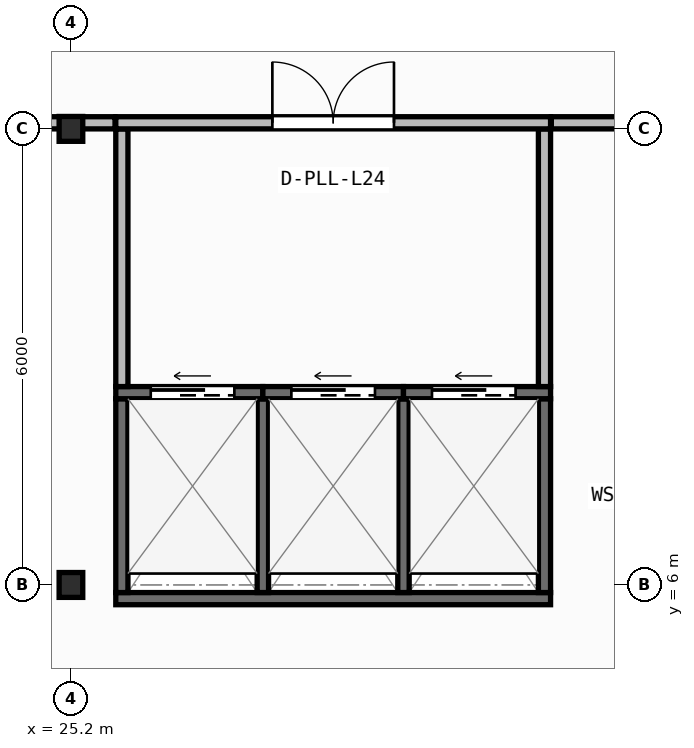
"""IFC4 building model, lengths in metres.
Left out: names, types, materials, properties, quantities, classifications, styles, units other than length and angle.
Written with IfcOpenShell. Run it as: python <this file> out.ifc"""

import sys

from ifc_helpers import new_model, si_unit, direction, frame, frame_2d, origin, origin_2d, place, context, subcontext, project, spatial, rectangle, i_section, extrude, element, fill, save


model = new_model("IFC4")
c1 = context("Model", 3, precision=1e-05, world=origin(), true_north=direction((0.0, 1.0)))
c2 = subcontext(c1, "Body", "Model", "MODEL_VIEW")
j1 = project(units=[si_unit("LENGTHUNIT", "METRE"), si_unit("PLANEANGLEUNIT", "RADIAN")], contexts=[c1])
p1 = place(None, origin())
s1 = spatial("IfcSite", under=j1, at=p1, CompositionType="ELEMENT")
p2 = place(p1, origin())
s2 = spatial("IfcBuilding", under=s1, at=p2, CompositionType="ELEMENT")
p3 = place(p2, frame((0.0, 0.0, 97.55)))
s3 = spatial("IfcBuildingStorey", under=s2, at=p3, CompositionType="ELEMENT", Elevation=97.55)
for number, where, z_axis, x_axis in (
    (1, (25.2, 6.0, 0.0), (0.0, 0.0, 1.0), (1.0, 0.0, 0.0)),
    (2, (25.2, 12.0, 0.0), (0.0, 0.0, 1.0), (1.0, 0.0, 0.0)),
):
    element("IfcColumn", number, at=place(p3, frame(where, z_axis=z_axis, x_axis=x_axis)), inside=s3, PredefinedType="COLUMN", context=c2, shape_type="SweptSolid", body=[
        extrude(i_section(OverallWidth=0.311, OverallDepth=0.327, WebThickness=0.016, FlangeThickness=0.025, FilletRadius=0.017, at=origin_2d()), origin(), (0.0, 0.0, 1.0), 5.8),
    ])
p4 = place(p3, frame((25.79, 5.82, 0.0), z_axis=(0.0, 0.0, 1.0), x_axis=(1.0, 0.0, 0.0)))
e3 = element("IfcWall", 3, at=p4, inside=s3, PredefinedType="SHEAR", context=c2, shape_type="SweptSolid", body=[
    extrude(rectangle(XDim=5.72, YDim=0.16, at=frame_2d((2.86, 0.0))), origin(), (0.0, 0.0, 1.0), 5.56),
])
for number, where, z_axis, x_axis in (
    (4, (25.87, 5.9, 0.0), (0.0, 0.0, 1.0), (0.0, 1.0, 0.0)),
    (5, (31.43, 5.9, 0.0), (0.0, 0.0, 1.0), (0.0, 1.0, 0.0)),
):
    element("IfcWall", number, at=place(p3, frame(where, z_axis=z_axis, x_axis=x_axis)), inside=s3, PredefinedType="SHEAR", context=c2, shape_type="SweptSolid", body=[
        extrude(rectangle(XDim=2.55, YDim=0.16, at=frame_2d((1.275, 0.0))), origin(), (0.0, 0.0, 1.0), 5.56),
    ])
for number, where, z_axis, x_axis in (
    (6, (27.725, 5.9, 0.0), (0.0, 0.0, 1.0), (0.0, 1.0, 0.0)),
    (7, (29.575, 5.9, 0.0), (0.0, 0.0, 1.0), (0.0, 1.0, 0.0)),
):
    element("IfcWall", number, at=place(p3, frame(where, z_axis=z_axis, x_axis=x_axis)), inside=s3, PredefinedType="SHEAR", context=c2, shape_type="SweptSolid", body=[
        extrude(rectangle(XDim=2.55, YDim=0.15, at=frame_2d((1.275, 0.0))), origin(), (0.0, 0.0, 1.0), 5.56),
    ])
p5 = place(p3, frame((25.79, 8.53, 0.0), z_axis=(0.0, 0.0, 1.0), x_axis=(1.0, 0.0, 0.0)))
e8 = element("IfcWall", 8, at=p5, inside=s3, PredefinedType="SHEAR", context=c2, shape_type="SweptSolid", body=[
    extrude(rectangle(XDim=1.935, YDim=0.16, at=frame_2d((0.968, 0.0))), origin(), (0.0, 0.0, 1.0), 5.56),
])
p6 = place(p5, frame((0.46, 0.0, 0.0)))
e9 = element("IfcOpeningElement", 9, at=p6, cuts=e8, PredefinedType="OPENING", context=c2, shape_type="SweptSolid", body=[
    extrude(rectangle(XDim=1.1, YDim=2.15, at=frame_2d((0.55, 1.075))), frame((0.0, 0.09, 0.0), z_axis=(0.0, -1.0, 0.0), x_axis=(1.0, 0.0, 0.0)), (0.0, 0.0, 1.0), 0.18),
])
p7 = place(p3, frame((27.725, 8.53, 0.0), z_axis=(0.0, 0.0, 1.0), x_axis=(1.0, 0.0, 0.0)))
e10 = element("IfcWall", 10, at=p7, inside=s3, PredefinedType="SHEAR", context=c2, shape_type="SweptSolid", body=[
    extrude(rectangle(XDim=1.85, YDim=0.16, at=frame_2d((0.925, 0.0))), origin(), (0.0, 0.0, 1.0), 5.56),
])
p8 = place(p7, frame((0.375, 0.0, 0.0)))
e11 = element("IfcOpeningElement", 11, at=p8, cuts=e10, PredefinedType="OPENING", context=c2, shape_type="SweptSolid", body=[
    extrude(rectangle(XDim=1.1, YDim=2.15, at=frame_2d((0.55, 1.075))), frame((0.0, 0.09, 0.0), z_axis=(0.0, -1.0, 0.0), x_axis=(1.0, 0.0, 0.0)), (0.0, 0.0, 1.0), 0.18),
])
p9 = place(p3, frame((29.575, 8.53, 0.0), z_axis=(0.0, 0.0, 1.0), x_axis=(1.0, 0.0, 0.0)))
e12 = element("IfcWall", 12, at=p9, inside=s3, PredefinedType="SHEAR", context=c2, shape_type="SweptSolid", body=[
    extrude(rectangle(XDim=1.935, YDim=0.16, at=frame_2d((0.968, 0.0))), origin(), (0.0, 0.0, 1.0), 5.56),
])
p10 = place(p9, frame((0.375, 0.0, 0.0)))
e13 = element("IfcOpeningElement", 13, at=p10, cuts=e12, PredefinedType="OPENING", context=c2, shape_type="SweptSolid", body=[
    extrude(rectangle(XDim=1.1, YDim=2.15, at=frame_2d((0.55, 1.075))), frame((0.0, 0.09, 0.0), z_axis=(0.0, -1.0, 0.0), x_axis=(1.0, 0.0, 0.0)), (0.0, 0.0, 1.0), 0.18),
])
for number, where, z_axis, x_axis in (
    (14, (25.87, 8.61, 0.0), (0.0, 0.0, 1.0), (0.0, 1.0, 0.0)),
    (15, (31.43, 8.61, 0.0), (0.0, 0.0, 1.0), (0.0, 1.0, 0.0)),
):
    element("IfcWall", number, at=place(p3, frame(where, z_axis=z_axis, x_axis=x_axis)), inside=s3, PredefinedType="PARTITIONING", context=c2, shape_type="SweptSolid", body=[
        extrude(rectangle(XDim=3.39, YDim=0.16, at=frame_2d((1.695, 0.0))), origin(), (0.0, 0.0, 1.0), 5.56),
    ])
p11 = place(p3, frame((25.79, 12.08, 0.0), z_axis=(0.0, 0.0, 1.0), x_axis=(1.0, 0.0, 0.0)))
e16 = element("IfcWall", 16, at=p11, inside=s3, PredefinedType="PARTITIONING", context=c2, shape_type="SweptSolid", body=[
    extrude(rectangle(XDim=5.72, YDim=0.16, at=frame_2d((2.86, 0.0))), origin(), (0.0, 0.0, 1.0), 4.835),
])
p12 = place(p11, frame((2.06, 0.0, 0.0)))
e17 = element("IfcOpeningElement", 17, at=p12, cuts=e16, PredefinedType="OPENING", context=c2, shape_type="SweptSolid", body=[
    extrude(rectangle(XDim=1.6, YDim=2.05, at=frame_2d((0.8, 1.025))), frame((0.0, 0.09, 0.0), z_axis=(0.0, -1.0, 0.0), x_axis=(1.0, 0.0, 0.0)), (0.0, 0.0, 1.0), 0.18),
])
p13 = place(p3, frame((23.92, 12.08, 0.0), z_axis=(0.0, 0.0, 1.0), x_axis=(1.0, 0.0, 0.0)))
e18 = element("IfcWall", 18, at=p13, inside=s3, PredefinedType="PARTITIONING", context=c2, shape_type="SweptSolid", body=[
    extrude(rectangle(XDim=1.86, YDim=0.16, at=frame_2d((0.93, 0.0))), origin(), (0.0, 0.0, 1.0), 4.835),
])
p14 = place(p3, frame((31.52, 12.08, 0.0), z_axis=(0.0, 0.0, 1.0), x_axis=(1.0, 0.0, 0.0)))
e19 = element("IfcWall", 19, at=p14, inside=s3, PredefinedType="PARTITIONING", context=c2, shape_type="SweptSolid", body=[
    extrude(rectangle(XDim=11.36, YDim=0.16, at=frame_2d((5.68, 0.0))), origin(), (0.0, 0.0, 1.0), 4.835),
])
p15 = place(p6, origin())
e20 = element("IfcDoor", 20, at=p15, inside=s3, OperationType="SLIDING_TO_LEFT", PredefinedType="DOOR", context=c2, shape_type="SweptSolid", body=[
    extrude(rectangle(XDim=1.1, YDim=2.15, at=frame_2d((0.55, 1.075))), frame((0.0, 0.025, 0.0), z_axis=(0.0, -1.0, 0.0), x_axis=(1.0, 0.0, 0.0)), (0.0, 0.0, 1.0), 0.05),
])
fill(e9, e20)
p16 = place(p8, origin())
e21 = element("IfcDoor", 21, at=p16, inside=s3, OperationType="SLIDING_TO_LEFT", PredefinedType="DOOR", context=c2, shape_type="SweptSolid", body=[
    extrude(rectangle(XDim=1.1, YDim=2.15, at=frame_2d((0.55, 1.075))), frame((0.0, 0.025, 0.0), z_axis=(0.0, -1.0, 0.0), x_axis=(1.0, 0.0, 0.0)), (0.0, 0.0, 1.0), 0.05),
])
fill(e11, e21)
p17 = place(p10, origin())
e22 = element("IfcDoor", 22, at=p17, inside=s3, OperationType="SLIDING_TO_LEFT", PredefinedType="DOOR", context=c2, shape_type="SweptSolid", body=[
    extrude(rectangle(XDim=1.1, YDim=2.15, at=frame_2d((0.55, 1.075))), frame((0.0, 0.025, 0.0), z_axis=(0.0, -1.0, 0.0), x_axis=(1.0, 0.0, 0.0)), (0.0, 0.0, 1.0), 0.05),
])
fill(e13, e22)
p18 = place(p12, origin())
e23 = element("IfcDoor", 23, at=p18, inside=s3, OperationType="DOUBLE_DOOR_SINGLE_SWING", PredefinedType="DOOR", context=c2, shape_type="SweptSolid", body=[
    extrude(rectangle(XDim=1.6, YDim=2.05, at=frame_2d((0.8, 1.025))), frame((0.0, 0.025, 0.0), z_axis=(0.0, -1.0, 0.0), x_axis=(1.0, 0.0, 0.0)), (0.0, 0.0, 1.0), 0.05),
])
fill(e17, e23)
save(model, sys.argv[1])
